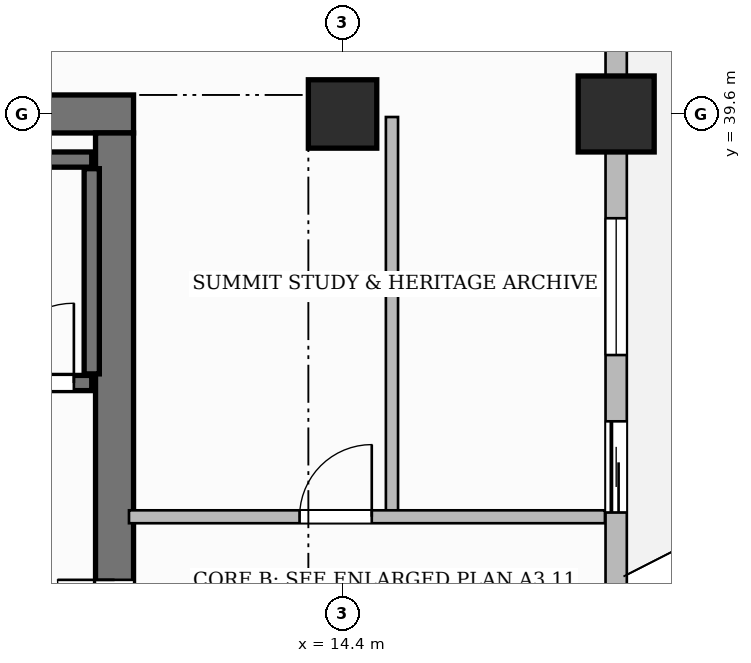
"""IFC4 building model, lengths in metres.
Left out: names, types, materials, properties, quantities, classifications, styles, units other than length and angle.
Written with IfcOpenShell. Run it as: python <this file> out.ifc"""

import sys

from ifc_helpers import new_model, si_unit, direction, frame, frame_2d, origin, origin_2d, place, context, subcontext, project, spatial, rectangle, extrude, source, transform, mapped, element, fill, save


model = new_model("IFC4")
c1 = context("Model", 3, precision=1e-05, world=origin(), true_north=direction((0.0, 1.0)))
c2 = subcontext(c1, "Body", "Model", "MODEL_VIEW")
j1 = project(units=[si_unit("LENGTHUNIT", "METRE"), si_unit("PLANEANGLEUNIT", "RADIAN")], contexts=[c1])
p1 = place(None, origin())
s1 = spatial("IfcSite", under=j1, at=p1, CompositionType="ELEMENT")
p2 = place(p1, origin())
s2 = spatial("IfcBuilding", under=s1, at=p2, CompositionType="ELEMENT")
p3 = place(p2, frame((0.0, 0.0, 205.75)))
s3 = spatial("IfcBuildingStorey", under=s2, at=p3, CompositionType="ELEMENT", Elevation=205.75)
p4 = place(p3, frame((3.35, 39.6, 0.0), z_axis=(0.0, 0.0, 1.0), x_axis=(1.0, 0.0, 0.0)))
e1 = element("IfcWall", 1, at=p4, inside=s3, PredefinedType="SHEAR", context=c2, shape_type="SweptSolid", body=[
    extrude(rectangle(XDim=8.3, YDim=0.5, at=frame_2d((4.15, 0.0))), origin(), (0.0, 0.0, 1.0), 3.85),
])
p5 = place(p3, frame((11.4, 25.45, 0.0), z_axis=(0.0, 0.0, 1.0), x_axis=(0.0, 1.0, 0.0)))
e2 = element("IfcWall", 2, at=p5, inside=s3, PredefinedType="SHEAR", context=c2, shape_type="SweptSolid", body=[
    extrude(rectangle(XDim=13.9, YDim=0.5, at=frame_2d((6.95, 0.0))), origin(), (0.0, 0.0, 1.0), 3.85),
])
p6 = place(p5, frame((6.52, 0.0, 0.0)))
e3 = element("IfcOpeningElement", 3, at=p6, cuts=e2, PredefinedType="OPENING", context=c2, shape_type="SweptSolid", body=[
    extrude(rectangle(XDim=1.5, YDim=2.2, at=frame_2d((0.75, 1.1))), frame((0.0, 0.26, 0.0), z_axis=(0.0, -1.0, 0.0), x_axis=(1.0, 0.0, 0.0)), (0.0, 0.0, 1.0), 0.52),
])
m1 = source(origin(), c2, "Body", "SweptSolid", [
    extrude(rectangle(XDim=0.9, YDim=0.9, at=origin_2d()), origin(), (0.0, 0.0, 1.0), 3.85),
])
p7 = place(p3, frame((14.4, 39.6, 0.0), z_axis=(0.0, 0.0, 1.0), x_axis=(1.0, 0.0, 0.0)))
e4 = element("IfcColumn", 4, at=p7, inside=s3, PredefinedType="COLUMN", context=c2, shape_type="MappedRepresentation", body=[
    mapped(m1, transform((0.0, 0.0, 0.0), scale=1.0)),
])
m2 = source(origin(), c2, "Body", "SweptSolid", [
    extrude(rectangle(XDim=1.0, YDim=1.0, at=origin_2d()), origin(), (0.0, 0.0, 1.0), 3.85),
])
p8 = place(p3, frame((18.0, 39.6, 0.0), z_axis=(0.0, 0.0, 1.0), x_axis=(1.0, 0.0, 0.0)))
e5 = element("IfcColumn", 5, at=p8, inside=s3, PredefinedType="COLUMN", context=c2, shape_type="MappedRepresentation", body=[
    mapped(m2, transform((0.0, 0.0, 0.0), scale=1.0)),
])
p9 = place(p3, frame((4.0, 39.0, 0.0), z_axis=(0.0, 0.0, 1.0), x_axis=(1.0, 0.0, 0.0)))
e6 = element("IfcWall", 6, at=p9, inside=s3, PredefinedType="SHEAR", context=c2, shape_type="SweptSolid", body=[
    extrude(rectangle(XDim=7.1, YDim=0.2, at=frame_2d((3.55, 0.0))), origin(), (0.0, 0.0, 1.0), 3.85),
])
p10 = place(p3, frame((11.1, 36.18, 0.0), z_axis=(0.0, 0.0, 1.0), x_axis=(0.0, 1.0, 0.0)))
e7 = element("IfcWall", 7, at=p10, inside=s3, PredefinedType="SHEAR", context=c2, shape_type="SweptSolid", body=[
    extrude(rectangle(XDim=2.7, YDim=0.2, at=frame_2d((1.35, 0.0))), origin(), (0.0, 0.0, 1.0), 3.85),
])
p11 = place(p3, frame((4.0, 36.06, 0.0), z_axis=(0.0, 0.0, 1.0), x_axis=(1.0, 0.0, 0.0)))
e8 = element("IfcWall", 8, at=p11, inside=s3, PredefinedType="SHEAR", context=c2, shape_type="SweptSolid", body=[
    extrude(rectangle(XDim=7.1, YDim=0.2, at=frame_2d((3.55, 0.0))), origin(), (0.0, 0.0, 1.0), 3.85),
])
p12 = place(p11, frame((5.815, 0.0, 0.0)))
e9 = element("IfcOpeningElement", 9, at=p12, cuts=e8, PredefinedType="OPENING", context=c2, shape_type="SweptSolid", body=[
    extrude(rectangle(XDim=1.05, YDim=2.2, at=frame_2d((0.525, 1.1))), frame((0.0, 0.11, 0.0), z_axis=(0.0, -1.0, 0.0), x_axis=(1.0, 0.0, 0.0)), (0.0, 0.0, 1.0), 0.22),
])
p13 = place(p3, frame((15.05, 34.34, 0.0), z_axis=(0.0, 0.0, 1.0), x_axis=(0.0, 1.0, 0.0)))
e10 = element("IfcWall", 10, at=p13, inside=s3, PredefinedType="PARTITIONING", context=c2, shape_type="SweptSolid", body=[
    extrude(rectangle(XDim=5.22, YDim=0.16, at=frame_2d((2.61, 0.0))), origin(), (0.0, 0.0, 1.0), 3.6),
])
p14 = place(p3, frame((11.59, 34.3, 0.0), z_axis=(0.0, 0.0, 1.0), x_axis=(1.0, 0.0, 0.0)))
e11 = element("IfcWall", 11, at=p14, inside=s3, PredefinedType="PARTITIONING", context=c2, shape_type="SweptSolid", body=[
    extrude(rectangle(XDim=6.262, YDim=0.17, at=frame_2d((3.131, 0.0))), origin(), (0.0, 0.0, 1.0), 3.6),
])
p15 = place(p14, frame((2.244, 0.0, 0.0)))
e12 = element("IfcOpeningElement", 12, at=p15, cuts=e11, PredefinedType="OPENING", context=c2, shape_type="SweptSolid", body=[
    extrude(rectangle(XDim=0.95, YDim=2.15, at=frame_2d((0.475, 1.075))), frame((0.0, 0.095, 0.0), z_axis=(0.0, -1.0, 0.0), x_axis=(1.0, 0.0, 0.0)), (0.0, 0.0, 1.0), 0.19),
])
p16 = place(p3, frame((18.0, 21.65, 0.0), z_axis=(0.0, 0.0, 1.0), x_axis=(0.0, 1.0, 0.0)))
e13 = element("IfcWall", 13, at=p16, inside=s3, PredefinedType="SOLIDWALL", context=c2, shape_type="SweptSolid", body=[
    extrude(rectangle(XDim=25.1, YDim=0.28, at=frame_2d((12.55, 0.0))), origin(), (0.0, 0.0, 1.0), 3.6),
])
p17 = place(p16, frame((12.706, 0.0, 0.0)))
e14 = element("IfcOpeningElement", 14, at=p17, cuts=e13, PredefinedType="OPENING", context=c2, shape_type="SweptSolid", body=[
    extrude(rectangle(XDim=1.2, YDim=2.2, at=frame_2d((0.6, 1.1))), frame((0.0, 0.15, 0.0), z_axis=(0.0, -1.0, 0.0), x_axis=(1.0, 0.0, 0.0)), (0.0, 0.0, 1.0), 0.3),
])
p18 = place(p16, frame((1.89, 0.0, 0.8)))
e15 = element("IfcOpeningElement", 15, at=p18, cuts=e13, PredefinedType="OPENING", context=c2, shape_type="SweptSolid", body=[
    extrude(rectangle(XDim=1.8, YDim=1.85, at=frame_2d((0.9, 0.925))), frame((0.0, 0.15, 0.0), z_axis=(0.0, -1.0, 0.0), x_axis=(1.0, 0.0, 0.0)), (0.0, 0.0, 1.0), 0.3),
])
p19 = place(p16, frame((6.63, 0.0, 0.8)))
e16 = element("IfcOpeningElement", 16, at=p19, cuts=e13, PredefinedType="OPENING", context=c2, shape_type="SweptSolid", body=[
    extrude(rectangle(XDim=1.8, YDim=1.85, at=frame_2d((0.9, 0.925))), frame((0.0, 0.15, 0.0), z_axis=(0.0, -1.0, 0.0), x_axis=(1.0, 0.0, 0.0)), (0.0, 0.0, 1.0), 0.3),
])
p20 = place(p16, frame((14.778, 0.0, 0.8)))
e17 = element("IfcOpeningElement", 17, at=p20, cuts=e13, PredefinedType="OPENING", context=c2, shape_type="SweptSolid", body=[
    extrude(rectangle(XDim=1.8, YDim=1.85, at=frame_2d((0.9, 0.925))), frame((0.0, 0.15, 0.0), z_axis=(0.0, -1.0, 0.0), x_axis=(1.0, 0.0, 0.0)), (0.0, 0.0, 1.0), 0.3),
])
p21 = place(p16, frame((19.275, 0.0, 0.8)))
e18 = element("IfcOpeningElement", 18, at=p21, cuts=e13, PredefinedType="OPENING", context=c2, shape_type="SweptSolid", body=[
    extrude(rectangle(XDim=1.8, YDim=1.85, at=frame_2d((0.9, 0.925))), frame((0.0, 0.15, 0.0), z_axis=(0.0, -1.0, 0.0), x_axis=(1.0, 0.0, 0.0)), (0.0, 0.0, 1.0), 0.3),
])
p22 = place(p16, frame((22.025, 0.0, 0.8)))
e19 = element("IfcOpeningElement", 19, at=p22, cuts=e13, PredefinedType="OPENING", context=c2, shape_type="SweptSolid", body=[
    extrude(rectangle(XDim=1.8, YDim=1.85, at=frame_2d((0.9, 0.925))), frame((0.0, 0.15, 0.0), z_axis=(0.0, -1.0, 0.0), x_axis=(1.0, 0.0, 0.0)), (0.0, 0.0, 1.0), 0.3),
])
m3 = source(origin(), c2, "Body", "SweptSolid", [
    extrude(rectangle(XDim=1.05, YDim=2.2, at=frame_2d((0.525, 1.1))), frame((0.0, 0.025, 0.0), z_axis=(0.0, -1.0, 0.0), x_axis=(1.0, 0.0, 0.0)), (0.0, 0.0, 1.0), 0.05),
])
p23 = place(p12, origin())
e20 = element("IfcDoor", 20, at=p23, inside=s3, OperationType="SINGLE_SWING_RIGHT", PredefinedType="DOOR", context=c2, shape_type="MappedRepresentation", body=[
    mapped(m3, transform((0.0, 0.0, 0.0), scale=1.0)),
])
fill(e9, e20)
m4 = source(origin(), c2, "Body", "SweptSolid", [
    extrude(rectangle(XDim=1.5, YDim=2.2, at=frame_2d((0.75, 1.1))), frame((0.0, 0.025, 0.0), z_axis=(0.0, -1.0, 0.0), x_axis=(1.0, 0.0, 0.0)), (0.0, 0.0, 1.0), 0.05),
])
p24 = place(p6, origin())
e21 = element("IfcDoor", 21, at=p24, inside=s3, OperationType="DOUBLE_DOOR_SINGLE_SWING", PredefinedType="DOOR", context=c2, shape_type="MappedRepresentation", body=[
    mapped(m4, transform((0.0, 0.0, 0.0), scale=1.0)),
])
fill(e3, e21)
m5 = source(origin(), c2, "Body", "SweptSolid", [
    extrude(rectangle(XDim=0.95, YDim=2.15, at=frame_2d((0.475, 1.075))), frame((0.0, 0.025, 0.0), z_axis=(0.0, -1.0, 0.0), x_axis=(1.0, 0.0, 0.0)), (0.0, 0.0, 1.0), 0.05),
])
p25 = place(p15, origin())
e22 = element("IfcDoor", 22, at=p25, inside=s3, OperationType="SINGLE_SWING_RIGHT", PredefinedType="DOOR", context=c2, shape_type="MappedRepresentation", body=[
    mapped(m5, transform((0.0, 0.0, 0.0), scale=1.0)),
])
fill(e12, e22)
m6 = source(origin(), c2, "Body", "SweptSolid", [
    extrude(rectangle(XDim=1.2, YDim=2.2, at=frame_2d((0.6, 1.1))), frame((0.0, 0.025, 0.0), z_axis=(0.0, -1.0, 0.0), x_axis=(1.0, 0.0, 0.0)), (0.0, 0.0, 1.0), 0.05),
])
p26 = place(p17, origin())
e23 = element("IfcDoor", 23, at=p26, inside=s3, OperationType="SLIDING_TO_LEFT", PredefinedType="DOOR", context=c2, shape_type="MappedRepresentation", body=[
    mapped(m6, transform((0.0, 0.0, 0.0), scale=1.0)),
])
fill(e14, e23)
m7 = source(origin(), c2, "Body", "SweptSolid", [
    extrude(rectangle(XDim=1.8, YDim=1.85, at=frame_2d((0.9, 0.925))), frame((0.0, 0.03, 0.0), z_axis=(0.0, -1.0, 0.0), x_axis=(1.0, 0.0, 0.0)), (0.0, 0.0, 1.0), 0.06),
])
p27 = place(p20, origin())
e24 = element("IfcWindow", 24, at=p27, inside=s3, PartitioningType="DOUBLE_PANEL_VERTICAL", PredefinedType="WINDOW", context=c2, shape_type="MappedRepresentation", body=[
    mapped(m7, transform((0.0, 0.0, 0.0), scale=1.0)),
])
fill(e17, e24)
save(model, sys.argv[1])
